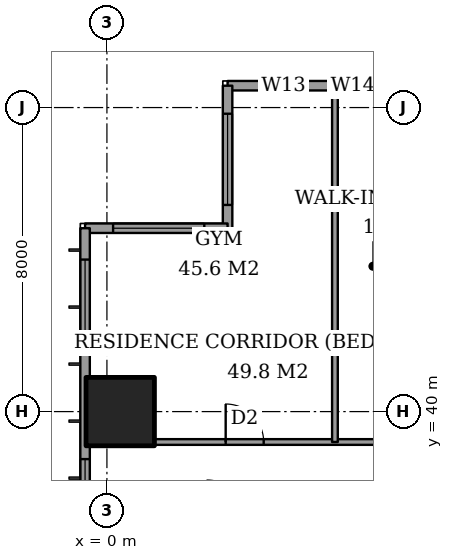
"""IFC4 building model, lengths in metres.
Left out: names, types, materials, properties, quantities, classifications, styles, units other than length and angle.
Written with IfcOpenShell. Run it as: python <this file> out.ifc"""

import sys

from ifc_helpers import new_model, si_unit, direction, frame, frame_2d, origin, origin_2d, place, context, subcontext, project, spatial, rectangle, extrude, element, fill, save


model = new_model("IFC4")
c1 = context("Model", 3, precision=1e-05, world=origin(), true_north=direction((0.0, 1.0)))
c2 = subcontext(c1, "Body", "Model", "MODEL_VIEW")
j1 = project(units=[si_unit("LENGTHUNIT", "METRE"), si_unit("PLANEANGLEUNIT", "RADIAN")], contexts=[c1])
p1 = place(None, origin())
s1 = spatial("IfcSite", under=j1, at=p1, CompositionType="ELEMENT")
p2 = place(p1, origin())
s2 = spatial("IfcBuilding", under=s1, at=p2, CompositionType="ELEMENT")
p3 = place(p2, frame((0.0, 0.0, 203.8)))
s3 = spatial("IfcBuildingStorey", under=s2, at=p3, CompositionType="ELEMENT", Elevation=203.8)
p4 = place(p3, frame((0.35, 40.0, 0.0), z_axis=(0.0, 0.0, 1.0), x_axis=(1.0, 0.0, 0.0)))
e1 = element("IfcColumn", 1, at=p4, inside=s3, PredefinedType="COLUMN", context=c2, shape_type="SweptSolid", body=[
    extrude(rectangle(XDim=1.8, YDim=1.8, at=origin_2d()), origin(), (0.0, 0.0, 1.0), 3.6),
])
p5 = place(p3, frame((24.575, 48.575, 0.0), z_axis=(0.0, 0.0, 1.0), x_axis=(-1.0, 0.0, 0.0)))
e2 = element("IfcWall", 2, at=p5, inside=s3, PredefinedType="SOLIDWALL", context=c2, shape_type="SweptSolid", body=[
    extrude(rectangle(XDim=21.4, YDim=0.25, at=frame_2d((10.7, 0.0))), origin(), (0.0, 0.0, 1.0), 3.6),
])
p6 = place(p5, frame((2.275, 0.0, 0.2)))
e3 = element("IfcOpeningElement", 3, at=p6, cuts=e2, PredefinedType="OPENING", context=c2, shape_type="SweptSolid", body=[
    extrude(rectangle(XDim=1.2, YDim=2.4, at=frame_2d((0.6, 1.2))), frame((0.0, 0.135, 0.0), z_axis=(0.0, -1.0, 0.0), x_axis=(1.0, 0.0, 0.0)), (0.0, 0.0, 1.0), 0.27),
])
p7 = place(p5, frame((4.475, 0.0, 0.2)))
e4 = element("IfcOpeningElement", 4, at=p7, cuts=e2, PredefinedType="OPENING", context=c2, shape_type="SweptSolid", body=[
    extrude(rectangle(XDim=2.4, YDim=2.4, at=frame_2d((1.2, 1.2))), frame((0.0, 0.135, 0.0), z_axis=(0.0, -1.0, 0.0), x_axis=(1.0, 0.0, 0.0)), (0.0, 0.0, 1.0), 0.27),
])
p8 = place(p5, frame((10.4, 0.0, 0.2)))
e5 = element("IfcOpeningElement", 5, at=p8, cuts=e2, PredefinedType="OPENING", context=c2, shape_type="SweptSolid", body=[
    extrude(rectangle(XDim=1.2, YDim=2.4, at=frame_2d((0.6, 1.2))), frame((0.0, 0.135, 0.0), z_axis=(0.0, -1.0, 0.0), x_axis=(1.0, 0.0, 0.0)), (0.0, 0.0, 1.0), 0.27),
])
p9 = place(p5, frame((12.525, 0.0, 0.2)))
e6 = element("IfcOpeningElement", 6, at=p9, cuts=e2, PredefinedType="OPENING", context=c2, shape_type="SweptSolid", body=[
    extrude(rectangle(XDim=2.4, YDim=2.4, at=frame_2d((1.2, 1.2))), frame((0.0, 0.135, 0.0), z_axis=(0.0, -1.0, 0.0), x_axis=(1.0, 0.0, 0.0)), (0.0, 0.0, 1.0), 0.27),
])
p10 = place(p5, frame((17.8, 0.0, 0.2)))
e7 = element("IfcOpeningElement", 7, at=p10, cuts=e2, PredefinedType="OPENING", context=c2, shape_type="SweptSolid", body=[
    extrude(rectangle(XDim=0.6, YDim=2.4, at=frame_2d((0.3, 1.2))), frame((0.0, 0.135, 0.0), z_axis=(0.0, -1.0, 0.0), x_axis=(1.0, 0.0, 0.0)), (0.0, 0.0, 1.0), 0.27),
])
p11 = place(p5, frame((19.325, 0.0, 0.2)))
e8 = element("IfcOpeningElement", 8, at=p11, cuts=e2, PredefinedType="OPENING", context=c2, shape_type="SweptSolid", body=[
    extrude(rectangle(XDim=1.2, YDim=2.4, at=frame_2d((0.6, 1.2))), frame((0.0, 0.135, 0.0), z_axis=(0.0, -1.0, 0.0), x_axis=(1.0, 0.0, 0.0)), (0.0, 0.0, 1.0), 0.27),
])
p12 = place(p3, frame((3.175, 48.575, 0.0), z_axis=(0.0, 0.0, 1.0), x_axis=(0.0, -1.0, 0.0)))
e9 = element("IfcWall", 9, at=p12, inside=s3, PredefinedType="SOLIDWALL", context=c2, shape_type="SweptSolid", body=[
    extrude(rectangle(XDim=3.75, YDim=0.25, at=frame_2d((1.875, 0.0))), origin(), (0.0, 0.0, 1.0), 3.6),
])
p13 = place(p12, frame((0.738, 0.0, 0.2)))
e10 = element("IfcOpeningElement", 10, at=p13, cuts=e9, PredefinedType="OPENING", context=c2, shape_type="SweptSolid", body=[
    extrude(rectangle(XDim=2.4, YDim=2.4, at=frame_2d((1.2, 1.2))), frame((0.0, 0.135, 0.0), z_axis=(0.0, -1.0, 0.0), x_axis=(1.0, 0.0, 0.0)), (0.0, 0.0, 1.0), 0.27),
])
p14 = place(p3, frame((3.175, 44.825, 0.0), z_axis=(0.0, 0.0, 1.0), x_axis=(-1.0, 0.0, 0.0)))
e11 = element("IfcWall", 11, at=p14, inside=s3, PredefinedType="SOLIDWALL", context=c2, shape_type="SweptSolid", body=[
    extrude(rectangle(XDim=3.75, YDim=0.25, at=frame_2d((1.875, 0.0))), origin(), (0.0, 0.0, 1.0), 3.6),
])
p15 = place(p14, frame((0.613, 0.0, 0.2)))
e12 = element("IfcOpeningElement", 12, at=p15, cuts=e11, PredefinedType="OPENING", context=c2, shape_type="SweptSolid", body=[
    extrude(rectangle(XDim=2.4, YDim=2.4, at=frame_2d((1.2, 1.2))), frame((0.0, 0.135, 0.0), z_axis=(0.0, -1.0, 0.0), x_axis=(1.0, 0.0, 0.0)), (0.0, 0.0, 1.0), 0.27),
])
p16 = place(p3, frame((-0.575, 44.825, 0.0), z_axis=(0.0, 0.0, 1.0), x_axis=(0.0, -1.0, 0.0)))
e13 = element("IfcWall", 13, at=p16, inside=s3, PredefinedType="SOLIDWALL", context=c2, shape_type="SweptSolid", body=[
    extrude(rectangle(XDim=41.65, YDim=0.25, at=frame_2d((20.825, 0.0))), origin(), (0.0, 0.0, 1.0), 3.6),
])
p17 = place(p16, frame((0.825, 0.0, 0.2)))
e14 = element("IfcOpeningElement", 14, at=p17, cuts=e13, PredefinedType="OPENING", context=c2, shape_type="SweptSolid", body=[
    extrude(rectangle(XDim=2.4, YDim=2.4, at=frame_2d((1.2, 1.2))), frame((0.0, 0.135, 0.0), z_axis=(0.0, -1.0, 0.0), x_axis=(1.0, 0.0, 0.0)), (0.0, 0.0, 1.0), 0.27),
])
p18 = place(p16, frame((6.075, 0.0, 0.2)))
e15 = element("IfcOpeningElement", 15, at=p18, cuts=e13, PredefinedType="OPENING", context=c2, shape_type="SweptSolid", body=[
    extrude(rectangle(XDim=1.2, YDim=2.4, at=frame_2d((0.6, 1.2))), frame((0.0, 0.135, 0.0), z_axis=(0.0, -1.0, 0.0), x_axis=(1.0, 0.0, 0.0)), (0.0, 0.0, 1.0), 0.27),
])
p19 = place(p16, frame((8.575, 0.0, 0.2)))
e16 = element("IfcOpeningElement", 16, at=p19, cuts=e13, PredefinedType="OPENING", context=c2, shape_type="SweptSolid", body=[
    extrude(rectangle(XDim=2.4, YDim=2.4, at=frame_2d((1.2, 1.2))), frame((0.0, 0.135, 0.0), z_axis=(0.0, -1.0, 0.0), x_axis=(1.0, 0.0, 0.0)), (0.0, 0.0, 1.0), 0.27),
])
p20 = place(p16, frame((15.675, 0.0, 0.2)))
e17 = element("IfcOpeningElement", 17, at=p20, cuts=e13, PredefinedType="OPENING", context=c2, shape_type="SweptSolid", body=[
    extrude(rectangle(XDim=2.4, YDim=2.4, at=frame_2d((1.2, 1.2))), frame((0.0, 0.135, 0.0), z_axis=(0.0, -1.0, 0.0), x_axis=(1.0, 0.0, 0.0)), (0.0, 0.0, 1.0), 0.27),
])
p21 = place(p16, frame((23.575, 0.0, 0.2)))
e18 = element("IfcOpeningElement", 18, at=p21, cuts=e13, PredefinedType="OPENING", context=c2, shape_type="SweptSolid", body=[
    extrude(rectangle(XDim=2.4, YDim=2.4, at=frame_2d((1.2, 1.2))), frame((0.0, 0.135, 0.0), z_axis=(0.0, -1.0, 0.0), x_axis=(1.0, 0.0, 0.0)), (0.0, 0.0, 1.0), 0.27),
])
p22 = place(p16, frame((30.775, 0.0, 0.2)))
e19 = element("IfcOpeningElement", 19, at=p22, cuts=e13, PredefinedType="OPENING", context=c2, shape_type="SweptSolid", body=[
    extrude(rectangle(XDim=2.4, YDim=2.4, at=frame_2d((1.2, 1.2))), frame((0.0, 0.135, 0.0), z_axis=(0.0, -1.0, 0.0), x_axis=(1.0, 0.0, 0.0)), (0.0, 0.0, 1.0), 0.27),
])
p23 = place(p16, frame((34.55, 0.0, 0.2)))
e20 = element("IfcOpeningElement", 20, at=p23, cuts=e13, PredefinedType="OPENING", context=c2, shape_type="SweptSolid", body=[
    extrude(rectangle(XDim=1.2, YDim=2.4, at=frame_2d((0.6, 1.2))), frame((0.0, 0.135, 0.0), z_axis=(0.0, -1.0, 0.0), x_axis=(1.0, 0.0, 0.0)), (0.0, 0.0, 1.0), 0.27),
])
p24 = place(p16, frame((38.425, 0.0, 0.2)))
e21 = element("IfcOpeningElement", 21, at=p24, cuts=e13, PredefinedType="OPENING", context=c2, shape_type="SweptSolid", body=[
    extrude(rectangle(XDim=2.4, YDim=2.4, at=frame_2d((1.2, 1.2))), frame((0.0, 0.135, 0.0), z_axis=(0.0, -1.0, 0.0), x_axis=(1.0, 0.0, 0.0)), (0.0, 0.0, 1.0), 0.27),
])
p25 = place(p3, frame((1.25, 39.2, 0.0), z_axis=(0.0, 0.0, 1.0), x_axis=(1.0, 0.0, 0.0)))
e22 = element("IfcWall", 22, at=p25, inside=s3, PredefinedType="PARTITIONING", context=c2, shape_type="SweptSolid", body=[
    extrude(rectangle(XDim=5.85, YDim=0.15, at=frame_2d((2.925, 0.0))), origin(), (0.0, 0.0, 1.0), 3.35),
])
p26 = place(p25, frame((1.875, 0.0, 0.0)))
e23 = element("IfcOpeningElement", 23, at=p26, cuts=e22, PredefinedType="OPENING", context=c2, shape_type="SweptSolid", body=[
    extrude(rectangle(XDim=1.0, YDim=2.1, at=frame_2d((0.5, 1.05))), frame((0.0, 0.085, 0.0), z_axis=(0.0, -1.0, 0.0), x_axis=(1.0, 0.0, 0.0)), (0.0, 0.0, 1.0), 0.17),
])
p27 = place(p3, frame((6.0, 39.2, 0.0), z_axis=(0.0, 0.0, 1.0), x_axis=(0.0, 1.0, 0.0)))
e24 = element("IfcWall", 24, at=p27, inside=s3, PredefinedType="PARTITIONING", context=c2, shape_type="SweptSolid", body=[
    extrude(rectangle(XDim=9.25, YDim=0.15, at=frame_2d((4.625, 0.0))), origin(), (0.0, 0.0, 1.0), 3.35),
])
p28 = place(p10, origin())
e25 = element("IfcWindow", 25, at=p28, inside=s3, PartitioningType="SINGLE_PANEL", PredefinedType="WINDOW", context=c2, shape_type="SweptSolid", body=[
    extrude(rectangle(XDim=0.6, YDim=2.4, at=frame_2d((0.3, 1.2))), frame((0.0, 0.03, 0.0), z_axis=(0.0, -1.0, 0.0), x_axis=(1.0, 0.0, 0.0)), (0.0, 0.0, 1.0), 0.06),
])
fill(e7, e25)
p29 = place(p11, origin())
e26 = element("IfcWindow", 26, at=p29, inside=s3, PartitioningType="SINGLE_PANEL", PredefinedType="WINDOW", context=c2, shape_type="SweptSolid", body=[
    extrude(rectangle(XDim=1.2, YDim=2.4, at=frame_2d((0.6, 1.2))), frame((0.0, 0.03, 0.0), z_axis=(0.0, -1.0, 0.0), x_axis=(1.0, 0.0, 0.0)), (0.0, 0.0, 1.0), 0.06),
])
fill(e8, e26)
p30 = place(p13, origin())
e27 = element("IfcWindow", 27, at=p30, inside=s3, PartitioningType="SINGLE_PANEL", PredefinedType="WINDOW", context=c2, shape_type="SweptSolid", body=[
    extrude(rectangle(XDim=2.4, YDim=2.4, at=frame_2d((1.2, 1.2))), frame((0.0, 0.03, 0.0), z_axis=(0.0, -1.0, 0.0), x_axis=(1.0, 0.0, 0.0)), (0.0, 0.0, 1.0), 0.06),
])
fill(e10, e27)
p31 = place(p15, origin())
e28 = element("IfcWindow", 28, at=p31, inside=s3, PartitioningType="SINGLE_PANEL", PredefinedType="WINDOW", context=c2, shape_type="SweptSolid", body=[
    extrude(rectangle(XDim=2.4, YDim=2.4, at=frame_2d((1.2, 1.2))), frame((0.0, 0.03, 0.0), z_axis=(0.0, -1.0, 0.0), x_axis=(1.0, 0.0, 0.0)), (0.0, 0.0, 1.0), 0.06),
])
fill(e12, e28)
p32 = place(p17, origin())
e29 = element("IfcWindow", 29, at=p32, inside=s3, PartitioningType="SINGLE_PANEL", PredefinedType="WINDOW", context=c2, shape_type="SweptSolid", body=[
    extrude(rectangle(XDim=2.4, YDim=2.4, at=frame_2d((1.2, 1.2))), frame((0.0, 0.03, 0.0), z_axis=(0.0, -1.0, 0.0), x_axis=(1.0, 0.0, 0.0)), (0.0, 0.0, 1.0), 0.06),
])
fill(e14, e29)
p33 = place(p18, origin())
e30 = element("IfcWindow", 30, at=p33, inside=s3, PartitioningType="SINGLE_PANEL", PredefinedType="WINDOW", context=c2, shape_type="SweptSolid", body=[
    extrude(rectangle(XDim=1.2, YDim=2.4, at=frame_2d((0.6, 1.2))), frame((0.0, 0.03, 0.0), z_axis=(0.0, -1.0, 0.0), x_axis=(1.0, 0.0, 0.0)), (0.0, 0.0, 1.0), 0.06),
])
fill(e15, e30)
p34 = place(p26, origin())
e31 = element("IfcDoor", 31, at=p34, inside=s3, OperationType="SINGLE_SWING_RIGHT", PredefinedType="DOOR", context=c2, shape_type="SweptSolid", body=[
    extrude(rectangle(XDim=1.0, YDim=2.1, at=frame_2d((0.5, 1.05))), frame((0.0, 0.025, 0.0), z_axis=(0.0, -1.0, 0.0), x_axis=(1.0, 0.0, 0.0)), (0.0, 0.0, 1.0), 0.05),
])
fill(e23, e31)
save(model, sys.argv[1])
